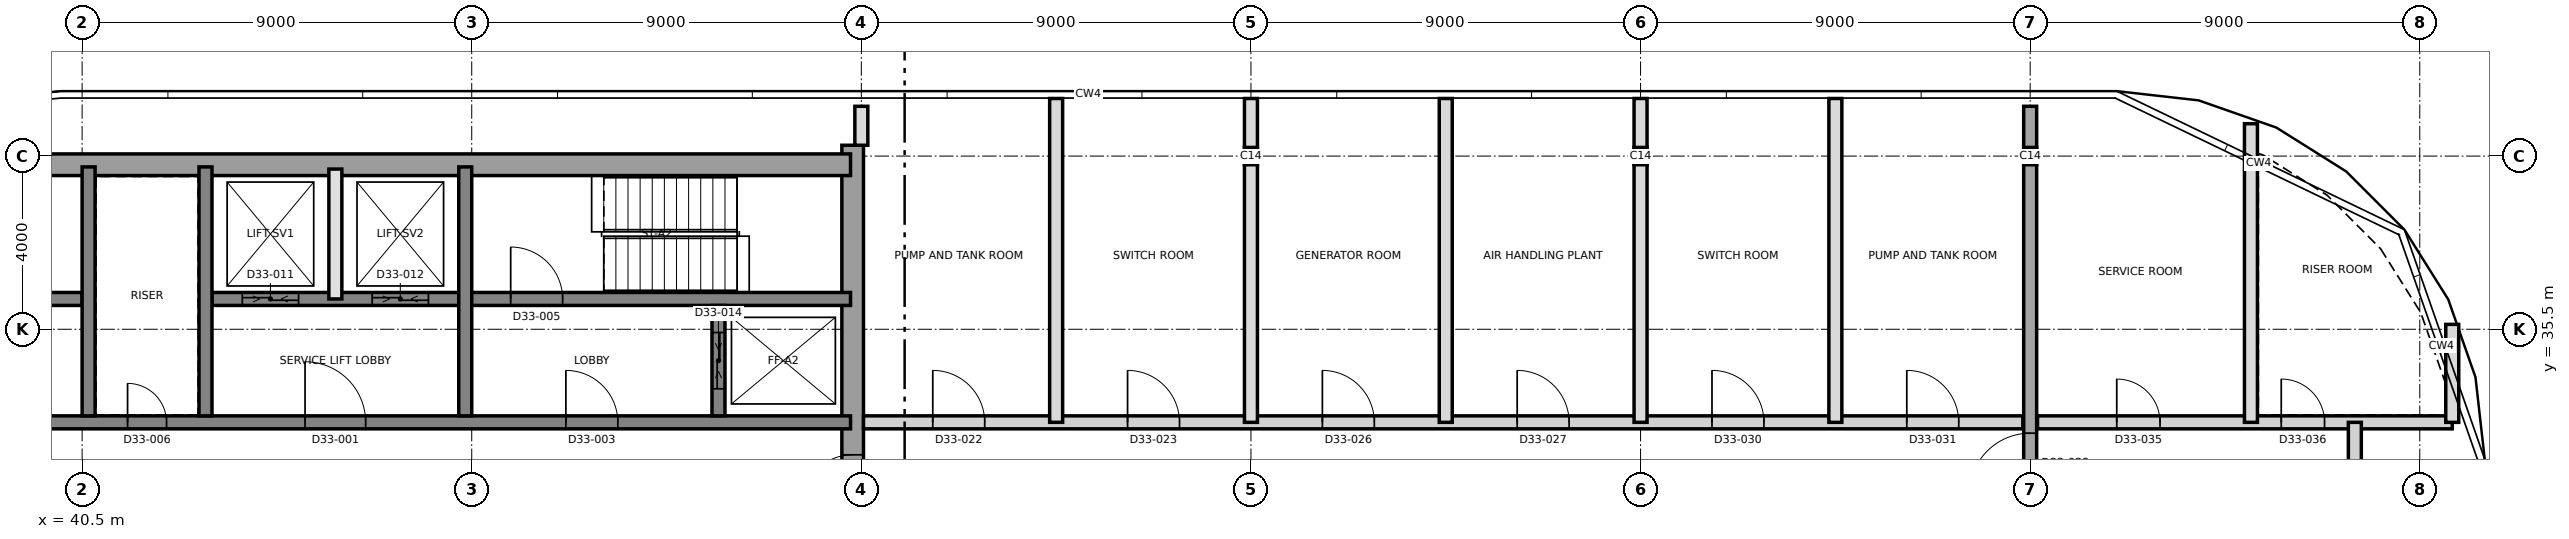
"""IFC4 building model, lengths in metres.
Left out: names, types, materials, properties, quantities, classifications, styles, units other than length and angle.
Written with IfcOpenShell. Run it as: python <this file> out.ifc"""

import sys

from ifc_helpers import new_model, si_unit, direction, frame, frame_2d, origin, origin_2d, place, context, subcontext, project, spatial, rectangle, i_section, extrude, element, fill, save


model = new_model("IFC4")
c1 = context("Model", 3, precision=1e-05, world=origin(), true_north=direction((0.0, 1.0)))
c2 = subcontext(c1, "Body", "Model", "MODEL_VIEW")
j1 = project(units=[si_unit("LENGTHUNIT", "METRE"), si_unit("PLANEANGLEUNIT", "RADIAN")], contexts=[c1])
p1 = place(None, origin())
s1 = spatial("IfcSite", under=j1, at=p1, CompositionType="ELEMENT")
p2 = place(p1, origin())
s2 = spatial("IfcBuilding", under=s1, at=p2, CompositionType="ELEMENT")
p3 = place(p2, frame((0.0, 0.0, 277.1)))
s3 = spatial("IfcBuildingStorey", under=s2, at=p3, CompositionType="ELEMENT", Elevation=277.1)
p4 = place(p3, frame((58.3, 21.25, 0.0), z_axis=(0.0, 0.0, 1.0), x_axis=(0.0, 1.0, 0.0)))
e1 = element("IfcWall", 1, at=p4, inside=s3, PredefinedType="SHEAR", context=c2, shape_type="SweptSolid", body=[
    extrude(rectangle(XDim=18.5, YDim=0.5, at=frame_2d((9.25, 0.0))), origin(), (0.0, 0.0, 1.0), 4.2),
])
p5 = place(p4, frame((10.15, 0.0, 0.0)))
e2 = element("IfcOpeningElement", 2, at=p5, cuts=e1, PredefinedType="OPENING", context=c2, shape_type="SweptSolid", body=[
    extrude(rectangle(XDim=1.2, YDim=2.1, at=frame_2d((0.6, 1.05))), frame((0.0, 0.26, 0.0), z_axis=(0.0, -1.0, 0.0), x_axis=(1.0, 0.0, 0.0)), (0.0, 0.0, 1.0), 0.52),
])
p6 = place(p3, frame((31.25, 39.3, 0.0), z_axis=(0.0, 0.0, 1.0), x_axis=(1.0, 0.0, 0.0)))
e3 = element("IfcWall", 3, at=p6, inside=s3, PredefinedType="SHEAR", context=c2, shape_type="SweptSolid", body=[
    extrude(rectangle(XDim=27.0, YDim=0.5, at=frame_2d((13.5, 0.0))), origin(), (0.0, 0.0, 1.0), 4.2),
])
p7 = place(p3, frame((31.75, 33.35, 0.0), z_axis=(0.0, 0.0, 1.0), x_axis=(1.0, 0.0, 0.0)))
e4 = element("IfcWall", 4, at=p7, inside=s3, PredefinedType="SHEAR", context=c2, shape_type="SweptSolid", body=[
    extrude(rectangle(XDim=26.5, YDim=0.3, at=frame_2d((13.25, 0.0))), origin(), (0.0, 0.0, 1.0), 4.2),
])
p8 = place(p7, frame((13.9, 0.0, 0.0)))
e5 = element("IfcOpeningElement", 5, at=p8, cuts=e4, PredefinedType="OPENING", context=c2, shape_type="SweptSolid", body=[
    extrude(rectangle(XDim=1.4, YDim=2.1, at=frame_2d((0.7, 1.05))), frame((0.0, 0.16, 0.0), z_axis=(0.0, -1.0, 0.0), x_axis=(1.0, 0.0, 0.0)), (0.0, 0.0, 1.0), 0.32),
])
p9 = place(p7, frame((5.375, 0.0, 0.0)))
e6 = element("IfcOpeningElement", 6, at=p9, cuts=e4, PredefinedType="OPENING", context=c2, shape_type="SweptSolid", body=[
    extrude(rectangle(XDim=1.2, YDim=2.1, at=frame_2d((0.6, 1.05))), frame((0.0, 0.16, 0.0), z_axis=(0.0, -1.0, 0.0), x_axis=(1.0, 0.0, 0.0)), (0.0, 0.0, 1.0), 0.32),
])
p10 = place(p7, frame((19.925, 0.0, 0.0)))
e7 = element("IfcOpeningElement", 7, at=p10, cuts=e4, PredefinedType="OPENING", context=c2, shape_type="SweptSolid", body=[
    extrude(rectangle(XDim=1.2, YDim=2.1, at=frame_2d((0.6, 1.05))), frame((0.0, 0.16, 0.0), z_axis=(0.0, -1.0, 0.0), x_axis=(1.0, 0.0, 0.0)), (0.0, 0.0, 1.0), 0.32),
])
p11 = place(p7, frame((9.8, 0.0, 0.0)))
e8 = element("IfcOpeningElement", 8, at=p11, cuts=e4, PredefinedType="OPENING", context=c2, shape_type="SweptSolid", body=[
    extrude(rectangle(XDim=0.9, YDim=2.1, at=frame_2d((0.45, 1.05))), frame((0.0, 0.16, 0.0), z_axis=(0.0, -1.0, 0.0), x_axis=(1.0, 0.0, 0.0)), (0.0, 0.0, 1.0), 0.32),
])
p12 = place(p3, frame((31.75, 36.2, 0.0), z_axis=(0.0, 0.0, 1.0), x_axis=(1.0, 0.0, 0.0)))
e9 = element("IfcWall", 9, at=p12, inside=s3, PredefinedType="SHEAR", context=c2, shape_type="SweptSolid", body=[
    extrude(rectangle(XDim=8.75, YDim=0.3, at=frame_2d((4.375, 0.0))), origin(), (0.0, 0.0, 1.0), 4.2),
])
p13 = place(p12, frame((6.65, 0.0, 0.0)))
e10 = element("IfcOpeningElement", 10, at=p13, cuts=e9, PredefinedType="OPENING", context=c2, shape_type="SweptSolid", body=[
    extrude(rectangle(XDim=1.2, YDim=2.1, at=frame_2d((0.6, 1.05))), frame((0.0, 0.16, 0.0), z_axis=(0.0, -1.0, 0.0), x_axis=(1.0, 0.0, 0.0)), (0.0, 0.0, 1.0), 0.32),
])
p14 = place(p3, frame((43.5, 36.2, 0.0), z_axis=(0.0, 0.0, 1.0), x_axis=(1.0, 0.0, 0.0)))
e11 = element("IfcWall", 11, at=p14, inside=s3, PredefinedType="SHEAR", context=c2, shape_type="SweptSolid", body=[
    extrude(rectangle(XDim=14.75, YDim=0.3, at=frame_2d((7.375, 0.0))), origin(), (0.0, 0.0, 1.0), 4.2),
])
p15 = place(p14, frame((6.9, 0.0, 0.0)))
e12 = element("IfcOpeningElement", 12, at=p15, cuts=e11, PredefinedType="OPENING", context=c2, shape_type="SweptSolid", body=[
    extrude(rectangle(XDim=1.2, YDim=2.1, at=frame_2d((0.6, 1.05))), frame((0.0, 0.16, 0.0), z_axis=(0.0, -1.0, 0.0), x_axis=(1.0, 0.0, 0.0)), (0.0, 0.0, 1.0), 0.32),
])
p16 = place(p14, frame((0.7, 0.0, 0.0)))
e13 = element("IfcOpeningElement", 13, at=p16, cuts=e11, PredefinedType="OPENING", context=c2, shape_type="SweptSolid", body=[
    extrude(rectangle(XDim=1.3, YDim=2.4, at=frame_2d((0.65, 1.2))), frame((0.0, 0.16, 0.0), z_axis=(0.0, -1.0, 0.0), x_axis=(1.0, 0.0, 0.0)), (0.0, 0.0, 1.0), 0.32),
])
p17 = place(p14, frame((3.7, 0.0, 0.0)))
e14 = element("IfcOpeningElement", 14, at=p17, cuts=e11, PredefinedType="OPENING", context=c2, shape_type="SweptSolid", body=[
    extrude(rectangle(XDim=1.3, YDim=2.4, at=frame_2d((0.65, 1.2))), frame((0.0, 0.16, 0.0), z_axis=(0.0, -1.0, 0.0), x_axis=(1.0, 0.0, 0.0)), (0.0, 0.0, 1.0), 0.32),
])
for number, where, z_axis, x_axis in (
    (15, (40.65, 33.5, 0.0), (0.0, 0.0, 1.0), (0.0, 1.0, 0.0)),
    (16, (43.35, 33.5, 0.0), (0.0, 0.0, 1.0), (0.0, 1.0, 0.0)),
    (17, (49.35, 33.5, 0.0), (0.0, 0.0, 1.0), (0.0, 1.0, 0.0)),
):
    element("IfcWall", number, at=place(p3, frame(where, z_axis=z_axis, x_axis=x_axis)), inside=s3, PredefinedType="SHEAR", context=c2, shape_type="SweptSolid", body=[
        extrude(rectangle(XDim=5.75, YDim=0.3, at=frame_2d((2.875, 0.0))), origin(), (0.0, 0.0, 1.0), 4.2),
    ])
p18 = place(p3, frame((55.2, 33.5, 0.0), z_axis=(0.0, 0.0, 1.0), x_axis=(0.0, 1.0, 0.0)))
e18 = element("IfcWall", 18, at=p18, inside=s3, PredefinedType="SHEAR", context=c2, shape_type="SweptSolid", body=[
    extrude(rectangle(XDim=2.55, YDim=0.3, at=frame_2d((1.275, 0.0))), origin(), (0.0, 0.0, 1.0), 4.2),
])
p19 = place(p18, frame((0.625, 0.0, 0.0)))
e19 = element("IfcOpeningElement", 19, at=p19, cuts=e18, PredefinedType="OPENING", context=c2, shape_type="SweptSolid", body=[
    extrude(rectangle(XDim=1.3, YDim=2.4, at=frame_2d((0.65, 1.2))), frame((0.0, 0.16, 0.0), z_axis=(0.0, -1.0, 0.0), x_axis=(1.0, 0.0, 0.0)), (0.0, 0.0, 1.0), 0.32),
])
p20 = place(p3, frame((85.5, 20.35, 0.0), z_axis=(0.0, 0.0, 1.0), x_axis=(0.0, 1.0, 0.0)))
e20 = element("IfcWall", 20, at=p20, inside=s3, PredefinedType="SHEAR", context=c2, shape_type="SweptSolid", body=[
    extrude(rectangle(XDim=20.3, YDim=0.3, at=frame_2d((10.15, 0.0))), origin(), (0.0, 0.0, 1.0), 4.2),
])
p21 = place(p20, frame((11.35, 0.0, 0.0)))
e21 = element("IfcOpeningElement", 21, at=p21, cuts=e20, PredefinedType="OPENING", context=c2, shape_type="SweptSolid", body=[
    extrude(rectangle(XDim=1.4, YDim=2.1, at=frame_2d((0.7, 1.05))), frame((0.0, 0.16, 0.0), z_axis=(0.0, -1.0, 0.0), x_axis=(1.0, 0.0, 0.0)), (0.0, 0.0, 1.0), 0.32),
])
for number, where, z_axis, x_axis in (
    (22, (67.5, 39.5, 0.0), (0.0, 0.0, 1.0), (1.0, 0.0, 0.0)),
    (23, (76.5, 39.5, 0.0), (0.0, 0.0, 1.0), (1.0, 0.0, 0.0)),
    (24, (85.5, 39.5, 0.0), (0.0, 0.0, 1.0), (1.0, 0.0, 0.0)),
):
    element("IfcColumn", number, at=place(p3, frame(where, z_axis=z_axis, x_axis=x_axis)), inside=s3, PredefinedType="COLUMN", context=c2, shape_type="SweptSolid", body=[
        extrude(i_section(OverallWidth=0.3, OverallDepth=0.4, WebThickness=0.013, FlangeThickness=0.024, FilletRadius=0.027, at=origin_2d()), origin(), (0.0, 0.0, 1.0), 4.2),
    ])
p22 = place(p3, frame((46.35, 36.2, 0.0), z_axis=(0.0, 0.0, 1.0), x_axis=(0.0, 1.0, 0.0)))
e25 = element("IfcWall", 25, at=p22, inside=s3, PredefinedType="SOLIDWALL", context=c2, shape_type="SweptSolid", body=[
    extrude(rectangle(XDim=3.0, YDim=0.3, at=frame_2d((1.5, 0.0))), origin(), (0.0, 0.0, 1.0), 3.9),
])
p23 = place(p3, frame((58.55, 33.35, 0.0), z_axis=(0.0, 0.0, 1.0), x_axis=(1.0, 0.0, 0.0)))
e26 = element("IfcWall", 26, at=p23, inside=s3, PredefinedType="PARTITIONING", context=c2, shape_type="SweptSolid", body=[
    extrude(rectangle(XDim=26.78, YDim=0.3, at=frame_2d((13.39, 0.0))), origin(), (0.0, 0.0, 1.0), 3.9),
])
p24 = place(p23, frame((1.6, 0.0, 0.0)))
e27 = element("IfcOpeningElement", 27, at=p24, cuts=e26, PredefinedType="OPENING", context=c2, shape_type="SweptSolid", body=[
    extrude(rectangle(XDim=1.2, YDim=2.1, at=frame_2d((0.6, 1.05))), frame((0.0, 0.16, 0.0), z_axis=(0.0, -1.0, 0.0), x_axis=(1.0, 0.0, 0.0)), (0.0, 0.0, 1.0), 0.32),
])
p25 = place(p23, frame((6.1, 0.0, 0.0)))
e28 = element("IfcOpeningElement", 28, at=p25, cuts=e26, PredefinedType="OPENING", context=c2, shape_type="SweptSolid", body=[
    extrude(rectangle(XDim=1.2, YDim=2.1, at=frame_2d((0.6, 1.05))), frame((0.0, 0.16, 0.0), z_axis=(0.0, -1.0, 0.0), x_axis=(1.0, 0.0, 0.0)), (0.0, 0.0, 1.0), 0.32),
])
p26 = place(p23, frame((10.6, 0.0, 0.0)))
e29 = element("IfcOpeningElement", 29, at=p26, cuts=e26, PredefinedType="OPENING", context=c2, shape_type="SweptSolid", body=[
    extrude(rectangle(XDim=1.2, YDim=2.1, at=frame_2d((0.6, 1.05))), frame((0.0, 0.16, 0.0), z_axis=(0.0, -1.0, 0.0), x_axis=(1.0, 0.0, 0.0)), (0.0, 0.0, 1.0), 0.32),
])
p27 = place(p23, frame((15.1, 0.0, 0.0)))
e30 = element("IfcOpeningElement", 30, at=p27, cuts=e26, PredefinedType="OPENING", context=c2, shape_type="SweptSolid", body=[
    extrude(rectangle(XDim=1.2, YDim=2.1, at=frame_2d((0.6, 1.05))), frame((0.0, 0.16, 0.0), z_axis=(0.0, -1.0, 0.0), x_axis=(1.0, 0.0, 0.0)), (0.0, 0.0, 1.0), 0.32),
])
p28 = place(p23, frame((19.6, 0.0, 0.0)))
e31 = element("IfcOpeningElement", 31, at=p28, cuts=e26, PredefinedType="OPENING", context=c2, shape_type="SweptSolid", body=[
    extrude(rectangle(XDim=1.2, YDim=2.1, at=frame_2d((0.6, 1.05))), frame((0.0, 0.16, 0.0), z_axis=(0.0, -1.0, 0.0), x_axis=(1.0, 0.0, 0.0)), (0.0, 0.0, 1.0), 0.32),
])
p29 = place(p23, frame((24.1, 0.0, 0.0)))
e32 = element("IfcOpeningElement", 32, at=p29, cuts=e26, PredefinedType="OPENING", context=c2, shape_type="SweptSolid", body=[
    extrude(rectangle(XDim=1.2, YDim=2.1, at=frame_2d((0.6, 1.05))), frame((0.0, 0.16, 0.0), z_axis=(0.0, -1.0, 0.0), x_axis=(1.0, 0.0, 0.0)), (0.0, 0.0, 1.0), 0.32),
])
p30 = place(p3, frame((85.67, 33.35, 0.0), z_axis=(0.0, 0.0, 1.0), x_axis=(1.0, 0.0, 0.0)))
e33 = element("IfcWall", 33, at=p30, inside=s3, PredefinedType="PARTITIONING", context=c2, shape_type="SweptSolid", body=[
    extrude(rectangle(XDim=9.58, YDim=0.3, at=frame_2d((4.79, 0.0))), origin(), (0.0, 0.0, 1.0), 3.9),
])
p31 = place(p30, frame((1.83, 0.0, 0.0)))
e34 = element("IfcOpeningElement", 34, at=p31, cuts=e33, PredefinedType="OPENING", context=c2, shape_type="SweptSolid", body=[
    extrude(rectangle(XDim=1.0, YDim=2.1, at=frame_2d((0.5, 1.05))), frame((0.0, 0.16, 0.0), z_axis=(0.0, -1.0, 0.0), x_axis=(1.0, 0.0, 0.0)), (0.0, 0.0, 1.0), 0.32),
])
p32 = place(p30, frame((5.63, 0.0, 0.0)))
e35 = element("IfcOpeningElement", 35, at=p32, cuts=e33, PredefinedType="OPENING", context=c2, shape_type="SweptSolid", body=[
    extrude(rectangle(XDim=1.0, YDim=2.1, at=frame_2d((0.5, 1.05))), frame((0.0, 0.16, 0.0), z_axis=(0.0, -1.0, 0.0), x_axis=(1.0, 0.0, 0.0)), (0.0, 0.0, 1.0), 0.32),
])
p33 = place(p3, frame((58.5, 39.75, 0.0), z_axis=(0.0, 0.0, 1.0), x_axis=(0.0, 1.0, 0.0)))
e36 = element("IfcWall", 36, at=p33, inside=s3, PredefinedType="PARTITIONING", context=c2, shape_type="SweptSolid", body=[
    extrude(rectangle(XDim=0.9, YDim=0.3, at=frame_2d((0.45, 0.0))), origin(), (0.0, 0.0, 1.0), 3.9),
])
for number, where, z_axis, x_axis in (
    (37, (63.0, 33.35, 0.0), (0.0, 0.0, 1.0), (0.0, 1.0, 0.0)),
    (38, (67.5, 33.35, 0.0), (0.0, 0.0, 1.0), (0.0, 1.0, 0.0)),
    (39, (72.0, 33.35, 0.0), (0.0, 0.0, 1.0), (0.0, 1.0, 0.0)),
    (40, (76.5, 33.35, 0.0), (0.0, 0.0, 1.0), (0.0, 1.0, 0.0)),
    (41, (81.0, 33.35, 0.0), (0.0, 0.0, 1.0), (0.0, 1.0, 0.0)),
):
    element("IfcWall", number, at=place(p3, frame(where, z_axis=z_axis, x_axis=x_axis)), inside=s3, PredefinedType="PARTITIONING", context=c2, shape_type="SweptSolid", body=[
        extrude(rectangle(XDim=7.48, YDim=0.3, at=frame_2d((3.74, 0.0))), origin(), (0.0, 0.0, 1.0), 3.9),
    ])
p34 = place(p3, frame((90.6, 33.35, 0.0), z_axis=(0.0, 0.0, 1.0), x_axis=(0.0, 1.0, 0.0)))
e42 = element("IfcWall", 42, at=p34, inside=s3, PredefinedType="PARTITIONING", context=c2, shape_type="SweptSolid", body=[
    extrude(rectangle(XDim=6.898, YDim=0.3, at=frame_2d((3.449, 0.0))), origin(), (0.0, 0.0, 1.0), 3.9),
])
p35 = place(p3, frame((93.0, 30.65, 0.0), z_axis=(0.0, 0.0, 1.0), x_axis=(0.0, 1.0, 0.0)))
e43 = element("IfcWall", 43, at=p35, inside=s3, PredefinedType="PARTITIONING", context=c2, shape_type="SweptSolid", body=[
    extrude(rectangle(XDim=2.7, YDim=0.3, at=frame_2d((1.35, 0.0))), origin(), (0.0, 0.0, 1.0), 3.9),
])
p36 = place(p3, frame((95.25, 33.35, 0.0), z_axis=(0.0, 0.0, 1.0), x_axis=(0.0, 1.0, 0.0)))
e44 = element("IfcWall", 44, at=p36, inside=s3, PredefinedType="PARTITIONING", context=c2, shape_type="SweptSolid", body=[
    extrude(rectangle(XDim=2.263, YDim=0.3, at=frame_2d((1.131, 0.0))), origin(), (0.0, 0.0, 1.0), 3.9),
])
p37 = place(p8, origin())
e45 = element("IfcDoor", 45, at=p37, inside=s3, OperationType="SINGLE_SWING_RIGHT", PredefinedType="DOOR", context=c2, shape_type="SweptSolid", body=[
    extrude(rectangle(XDim=1.4, YDim=2.1, at=frame_2d((0.7, 1.05))), frame((0.0, 0.025, 0.0), z_axis=(0.0, -1.0, 0.0), x_axis=(1.0, 0.0, 0.0)), (0.0, 0.0, 1.0), 0.05),
])
fill(e5, e45)
p38 = place(p10, origin())
e46 = element("IfcDoor", 46, at=p38, inside=s3, OperationType="SINGLE_SWING_RIGHT", PredefinedType="DOOR", context=c2, shape_type="SweptSolid", body=[
    extrude(rectangle(XDim=1.2, YDim=2.1, at=frame_2d((0.6, 1.05))), frame((0.0, 0.025, 0.0), z_axis=(0.0, -1.0, 0.0), x_axis=(1.0, 0.0, 0.0)), (0.0, 0.0, 1.0), 0.05),
])
fill(e7, e46)
p39 = place(p15, origin())
e47 = element("IfcDoor", 47, at=p39, inside=s3, OperationType="SINGLE_SWING_LEFT", PredefinedType="DOOR", context=c2, shape_type="SweptSolid", body=[
    extrude(rectangle(XDim=1.2, YDim=2.1, at=frame_2d((0.6, 1.05))), frame((0.0, 0.025, 0.0), z_axis=(0.0, -1.0, 0.0), x_axis=(1.0, 0.0, 0.0)), (0.0, 0.0, 1.0), 0.05),
])
fill(e12, e47)
p40 = place(p11, origin())
e48 = element("IfcDoor", 48, at=p40, inside=s3, OperationType="SINGLE_SWING_LEFT", PredefinedType="DOOR", context=c2, shape_type="SweptSolid", body=[
    extrude(rectangle(XDim=0.9, YDim=2.1, at=frame_2d((0.45, 1.05))), frame((0.0, 0.025, 0.0), z_axis=(0.0, -1.0, 0.0), x_axis=(1.0, 0.0, 0.0)), (0.0, 0.0, 1.0), 0.05),
])
fill(e8, e48)
p41 = place(p5, origin())
e49 = element("IfcDoor", 49, at=p41, inside=s3, OperationType="SINGLE_SWING_LEFT", PredefinedType="DOOR", context=c2, shape_type="SweptSolid", body=[
    extrude(rectangle(XDim=1.2, YDim=2.1, at=frame_2d((0.6, 1.05))), frame((0.0, 0.025, 0.0), z_axis=(0.0, -1.0, 0.0), x_axis=(1.0, 0.0, 0.0)), (0.0, 0.0, 1.0), 0.05),
])
fill(e2, e49)
p42 = place(p16, origin())
e50 = element("IfcDoor", 50, at=p42, inside=s3, OperationType="SLIDING_TO_LEFT", PredefinedType="DOOR", context=c2, shape_type="SweptSolid", body=[
    extrude(rectangle(XDim=1.3, YDim=2.4, at=frame_2d((0.65, 1.2))), frame((0.0, 0.025, 0.0), z_axis=(0.0, -1.0, 0.0), x_axis=(1.0, 0.0, 0.0)), (0.0, 0.0, 1.0), 0.05),
])
fill(e13, e50)
p43 = place(p17, origin())
e51 = element("IfcDoor", 51, at=p43, inside=s3, OperationType="SLIDING_TO_LEFT", PredefinedType="DOOR", context=c2, shape_type="SweptSolid", body=[
    extrude(rectangle(XDim=1.3, YDim=2.4, at=frame_2d((0.65, 1.2))), frame((0.0, 0.025, 0.0), z_axis=(0.0, -1.0, 0.0), x_axis=(1.0, 0.0, 0.0)), (0.0, 0.0, 1.0), 0.05),
])
fill(e14, e51)
p44 = place(p19, origin())
e52 = element("IfcDoor", 52, at=p44, inside=s3, OperationType="SLIDING_TO_LEFT", PredefinedType="DOOR", context=c2, shape_type="SweptSolid", body=[
    extrude(rectangle(XDim=1.3, YDim=2.4, at=frame_2d((0.65, 1.2))), frame((0.0, 0.025, 0.0), z_axis=(0.0, -1.0, 0.0), x_axis=(1.0, 0.0, 0.0)), (0.0, 0.0, 1.0), 0.05),
])
fill(e19, e52)
p45 = place(p24, origin())
e53 = element("IfcDoor", 53, at=p45, inside=s3, OperationType="SINGLE_SWING_LEFT", PredefinedType="DOOR", context=c2, shape_type="SweptSolid", body=[
    extrude(rectangle(XDim=1.2, YDim=2.1, at=frame_2d((0.6, 1.05))), frame((0.0, 0.025, 0.0), z_axis=(0.0, -1.0, 0.0), x_axis=(1.0, 0.0, 0.0)), (0.0, 0.0, 1.0), 0.05),
])
fill(e27, e53)
p46 = place(p25, origin())
e54 = element("IfcDoor", 54, at=p46, inside=s3, OperationType="SINGLE_SWING_LEFT", PredefinedType="DOOR", context=c2, shape_type="SweptSolid", body=[
    extrude(rectangle(XDim=1.2, YDim=2.1, at=frame_2d((0.6, 1.05))), frame((0.0, 0.025, 0.0), z_axis=(0.0, -1.0, 0.0), x_axis=(1.0, 0.0, 0.0)), (0.0, 0.0, 1.0), 0.05),
])
fill(e28, e54)
p47 = place(p26, origin())
e55 = element("IfcDoor", 55, at=p47, inside=s3, OperationType="SINGLE_SWING_LEFT", PredefinedType="DOOR", context=c2, shape_type="SweptSolid", body=[
    extrude(rectangle(XDim=1.2, YDim=2.1, at=frame_2d((0.6, 1.05))), frame((0.0, 0.025, 0.0), z_axis=(0.0, -1.0, 0.0), x_axis=(1.0, 0.0, 0.0)), (0.0, 0.0, 1.0), 0.05),
])
fill(e29, e55)
p48 = place(p27, origin())
e56 = element("IfcDoor", 56, at=p48, inside=s3, OperationType="SINGLE_SWING_RIGHT", PredefinedType="DOOR", context=c2, shape_type="SweptSolid", body=[
    extrude(rectangle(XDim=1.2, YDim=2.1, at=frame_2d((0.6, 1.05))), frame((0.0, 0.025, 0.0), z_axis=(0.0, -1.0, 0.0), x_axis=(1.0, 0.0, 0.0)), (0.0, 0.0, 1.0), 0.05),
])
fill(e30, e56)
p49 = place(p28, origin())
e57 = element("IfcDoor", 57, at=p49, inside=s3, OperationType="SINGLE_SWING_RIGHT", PredefinedType="DOOR", context=c2, shape_type="SweptSolid", body=[
    extrude(rectangle(XDim=1.2, YDim=2.1, at=frame_2d((0.6, 1.05))), frame((0.0, 0.025, 0.0), z_axis=(0.0, -1.0, 0.0), x_axis=(1.0, 0.0, 0.0)), (0.0, 0.0, 1.0), 0.05),
])
fill(e31, e57)
p50 = place(p29, origin())
e58 = element("IfcDoor", 58, at=p50, inside=s3, OperationType="SINGLE_SWING_LEFT", PredefinedType="DOOR", context=c2, shape_type="SweptSolid", body=[
    extrude(rectangle(XDim=1.2, YDim=2.1, at=frame_2d((0.6, 1.05))), frame((0.0, 0.025, 0.0), z_axis=(0.0, -1.0, 0.0), x_axis=(1.0, 0.0, 0.0)), (0.0, 0.0, 1.0), 0.05),
])
fill(e32, e58)
p51 = place(p31, origin())
e59 = element("IfcDoor", 59, at=p51, inside=s3, OperationType="SINGLE_SWING_LEFT", PredefinedType="DOOR", context=c2, shape_type="SweptSolid", body=[
    extrude(rectangle(XDim=1.0, YDim=2.1, at=frame_2d((0.5, 1.05))), frame((0.0, 0.025, 0.0), z_axis=(0.0, -1.0, 0.0), x_axis=(1.0, 0.0, 0.0)), (0.0, 0.0, 1.0), 0.05),
])
fill(e34, e59)
p52 = place(p32, origin())
e60 = element("IfcDoor", 60, at=p52, inside=s3, OperationType="SINGLE_SWING_RIGHT", PredefinedType="DOOR", context=c2, shape_type="SweptSolid", body=[
    extrude(rectangle(XDim=1.0, YDim=2.1, at=frame_2d((0.5, 1.05))), frame((0.0, 0.025, 0.0), z_axis=(0.0, -1.0, 0.0), x_axis=(1.0, 0.0, 0.0)), (0.0, 0.0, 1.0), 0.05),
])
fill(e35, e60)
p53 = place(p21, origin())
e61 = element("IfcDoor", 61, at=p53, inside=s3, OperationType="SINGLE_SWING_RIGHT", PredefinedType="DOOR", context=c2, shape_type="SweptSolid", body=[
    extrude(rectangle(XDim=1.4, YDim=2.1, at=frame_2d((0.7, 1.05))), frame((0.0, 0.025, 0.0), z_axis=(0.0, -1.0, 0.0), x_axis=(1.0, 0.0, 0.0)), (0.0, 0.0, 1.0), 0.05),
])
fill(e21, e61)
save(model, sys.argv[1])
